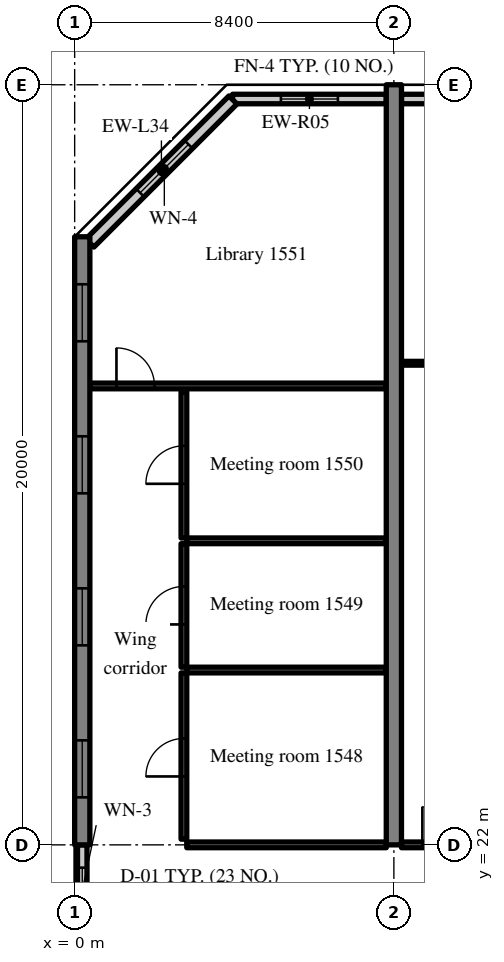
"""IFC4 building model, lengths in metres.
Left out: names, types, materials, properties, quantities, classifications, styles, units other than length and angle.
Written with IfcOpenShell. Run it as: python <this file> out.ifc"""

import sys

from ifc_helpers import new_model, si_unit, direction, frame, frame_2d, origin, place, context, subcontext, project, spatial, rectangle, extrude, source, transform, mapped, element, fill, save


model = new_model("IFC4")
c1 = context("Model", 3, precision=1e-05, world=origin(), true_north=direction((0.0, 1.0)))
c2 = subcontext(c1, "Body", "Model", "MODEL_VIEW")
j1 = project(units=[si_unit("LENGTHUNIT", "METRE"), si_unit("PLANEANGLEUNIT", "RADIAN")], contexts=[c1])
p1 = place(None, origin())
s1 = spatial("IfcSite", under=j1, at=p1, CompositionType="ELEMENT")
p2 = place(p1, origin())
s2 = spatial("IfcBuilding", under=s1, at=p2, CompositionType="ELEMENT")
p3 = place(p2, frame((0.0, 0.0, 65.8)))
s3 = spatial("IfcBuildingStorey", under=s2, at=p3, CompositionType="ELEMENT", Elevation=65.8)
m1 = source(origin(), c2, "Body", "SweptSolid", [
    extrude(rectangle(XDim=16.0, YDim=0.4, at=frame_2d((8.0, 0.0))), origin(), (0.0, 0.0, 1.0), 3.52),
])
p4 = place(p3, frame((0.2, 22.0, 0.0), z_axis=(0.0, 0.0, 1.0), x_axis=(0.0, 1.0, 0.0)))
e1 = element("IfcWall", 1, at=p4, inside=s3, PredefinedType="SHEAR", context=c2, shape_type="MappedRepresentation", body=[
    mapped(m1, transform((0.0, 0.0, 0.0), scale=1.0)),
])
m2 = source(origin(), c2, "Body", "SweptSolid", [
    extrude(rectangle(XDim=1.5, YDim=1.5, at=frame_2d((0.75, 0.75))), frame((0.0, 0.21, 0.0), z_axis=(0.0, -1.0, 0.0), x_axis=(1.0, 0.0, 0.0)), (0.0, 0.0, 1.0), 0.42),
])
p5 = place(p4, frame((1.25, 0.0, 0.9)))
e2 = element("IfcOpeningElement", 2, at=p5, cuts=e1, PredefinedType="OPENING", context=c2, shape_type="MappedRepresentation", body=[
    mapped(m2, transform((0.0, 0.0, 0.0), scale=1.0)),
])
p6 = place(p4, frame((5.25, 0.0, 0.9)))
e3 = element("IfcOpeningElement", 3, at=p6, cuts=e1, PredefinedType="OPENING", context=c2, shape_type="MappedRepresentation", body=[
    mapped(m2, transform((0.0, 0.0, 0.0), scale=1.0)),
])
p7 = place(p4, frame((9.25, 0.0, 0.9)))
e4 = element("IfcOpeningElement", 4, at=p7, cuts=e1, PredefinedType="OPENING", context=c2, shape_type="MappedRepresentation", body=[
    mapped(m2, transform((0.0, 0.0, 0.0), scale=1.0)),
])
p8 = place(p4, frame((13.25, 0.0, 0.9)))
e5 = element("IfcOpeningElement", 5, at=p8, cuts=e1, PredefinedType="OPENING", context=c2, shape_type="MappedRepresentation", body=[
    mapped(m2, transform((0.0, 0.0, 0.0), scale=1.0)),
])
m3 = source(origin(), c2, "Body", "SweptSolid", [
    extrude(rectangle(XDim=20.0, YDim=0.4, at=frame_2d((10.0, 0.0))), origin(), (0.0, 0.0, 1.0), 3.52),
])
p9 = place(p3, frame((8.4, 22.0, 0.0), z_axis=(0.0, 0.0, 1.0), x_axis=(0.0, 1.0, 0.0)))
e6 = element("IfcWall", 6, at=p9, inside=s3, PredefinedType="SHEAR", context=c2, shape_type="MappedRepresentation", body=[
    mapped(m3, transform((0.0, 0.0, 0.0), scale=1.0)),
])
m4 = source(origin(), c2, "Body", "SweptSolid", [
    extrude(rectangle(XDim=4.045, YDim=0.25, at=frame_2d((2.022, 0.0))), origin(), (0.0, 0.0, 1.0), 2.82),
])
p10 = place(p3, frame((8.2, 41.625, 0.0), z_axis=(0.0, 0.0, 1.0), x_axis=(-1.0, 0.0, 0.0)))
e7 = element("IfcWall", 7, at=p10, inside=s3, PredefinedType="SOLIDWALL", context=c2, shape_type="MappedRepresentation", body=[
    mapped(m4, transform((0.0, 0.0, 0.0), scale=1.0)),
])
m5 = source(origin(), c2, "Body", "SweptSolid", [
    extrude(rectangle(XDim=1.5, YDim=1.5, at=frame_2d((0.75, 0.75))), frame((0.0, 0.135, 0.0), z_axis=(0.0, -1.0, 0.0), x_axis=(1.0, 0.0, 0.0)), (0.0, 0.0, 1.0), 0.27),
])
p11 = place(p10, frame((1.272, 0.0, 0.9)))
e8 = element("IfcOpeningElement", 8, at=p11, cuts=e7, PredefinedType="OPENING", context=c2, shape_type="MappedRepresentation", body=[
    mapped(m5, transform((0.0, 0.0, 0.0), scale=1.0)),
])
m6 = source(origin(), c2, "Body", "SweptSolid", [
    extrude(rectangle(XDim=3.6, YDim=0.25, at=frame_2d((1.8, 0.0))), origin(), (0.0, 0.0, 1.0), 2.82),
])
p12 = place(p3, frame((12.2, 41.625, 0.0), z_axis=(0.0, 0.0, 1.0), x_axis=(-1.0, 0.0, 0.0)))
e9 = element("IfcWall", 9, at=p12, inside=s3, PredefinedType="SOLIDWALL", context=c2, shape_type="MappedRepresentation", body=[
    mapped(m6, transform((0.0, 0.0, 0.0), scale=1.0)),
])
p13 = place(p12, frame((1.05, 0.0, 0.9)))
e10 = element("IfcOpeningElement", 10, at=p13, cuts=e9, PredefinedType="OPENING", context=c2, shape_type="MappedRepresentation", body=[
    mapped(m5, transform((0.0, 0.0, 0.0), scale=1.0)),
])
m7 = source(origin(), c2, "Body", "SweptSolid", [
    extrude(rectangle(XDim=5.326, YDim=0.3, at=frame_2d((2.663, 0.0))), origin(), (0.0, 0.0, 1.0), 3.52),
])
p14 = place(p3, frame((4.166, 41.6, 0.0), z_axis=(0.0, 0.0, 1.0), x_axis=(-0.707106781187, -0.707106781187, 0.0)))
e11 = element("IfcWall", 11, at=p14, inside=s3, PredefinedType="SOLIDWALL", context=c2, shape_type="MappedRepresentation", body=[
    mapped(m7, transform((0.0, 0.0, 0.0), scale=1.0)),
])
m8 = source(origin(), c2, "Body", "SweptSolid", [
    extrude(rectangle(XDim=1.8, YDim=1.5, at=frame_2d((0.9, 0.75))), frame((0.0, 0.16, 0.0), z_axis=(0.0, -1.0, 0.0), x_axis=(1.0, 0.0, 0.0)), (0.0, 0.0, 1.0), 0.32),
])
p15 = place(p14, frame((1.654, 0.0, 0.9)))
e12 = element("IfcOpeningElement", 12, at=p15, cuts=e11, PredefinedType="OPENING", context=c2, shape_type="MappedRepresentation", body=[
    mapped(m8, transform((0.0, 0.0, 0.0), scale=1.0)),
])
m9 = source(origin(), c2, "Body", "SweptSolid", [
    extrude(rectangle(XDim=2.4, YDim=0.25, at=frame_2d((1.2, 0.0))), origin(), (0.0, 0.0, 1.0), 2.62),
])
p16 = place(p3, frame((0.2, 19.6, 0.0), z_axis=(0.0, 0.0, 1.0), x_axis=(0.0, 1.0, 0.0)))
e13 = element("IfcWall", 13, at=p16, inside=s3, PredefinedType="SOLIDWALL", context=c2, shape_type="MappedRepresentation", body=[
    mapped(m9, transform((0.0, 0.0, 0.0), scale=1.0)),
])
m10 = source(origin(), c2, "Body", "SweptSolid", [
    extrude(rectangle(XDim=1.2, YDim=1.5, at=frame_2d((0.6, 0.75))), frame((0.0, 0.135, 0.0), z_axis=(0.0, -1.0, 0.0), x_axis=(1.0, 0.0, 0.0)), (0.0, 0.0, 1.0), 0.27),
])
p17 = place(p16, frame((0.6, 0.0, 0.9)))
e14 = element("IfcOpeningElement", 14, at=p17, cuts=e13, PredefinedType="OPENING", context=c2, shape_type="MappedRepresentation", body=[
    mapped(m10, transform((0.0, 0.0, 0.0), scale=1.0)),
])
m11 = source(origin(), c2, "Body", "SweptSolid", [
    extrude(rectangle(XDim=5.25, YDim=0.15, at=frame_2d((2.625, 0.0))), origin(), (0.0, 0.0, 1.0), 2.82),
])
p18 = place(p3, frame((2.95, 22.0, 0.0), z_axis=(0.0, 0.0, 1.0), x_axis=(1.0, 0.0, 0.0)))
e15 = element("IfcWall", 15, at=p18, inside=s3, PredefinedType="PARTITIONING", context=c2, shape_type="MappedRepresentation", body=[
    mapped(m11, transform((0.0, 0.0, 0.0), scale=1.0)),
])
m12 = source(origin(), c2, "Body", "SweptSolid", [
    extrude(rectangle(XDim=4.375, YDim=0.15, at=frame_2d((2.188, 0.0))), origin(), (0.0, 0.0, 1.0), 3.52),
])
p19 = place(p3, frame((2.875, 22.15, 0.0), z_axis=(0.0, 0.0, 1.0), x_axis=(0.0, 1.0, 0.0)))
e16 = element("IfcWall", 16, at=p19, inside=s3, PredefinedType="PARTITIONING", context=c2, shape_type="MappedRepresentation", body=[
    mapped(m12, transform((0.0, 0.0, 0.0), scale=1.0)),
])
m13 = source(origin(), c2, "Body", "SweptSolid", [
    extrude(rectangle(XDim=1.0, YDim=2.1, at=frame_2d((0.5, 1.05))), frame((0.0, 0.085, 0.0), z_axis=(0.0, -1.0, 0.0), x_axis=(1.0, 0.0, 0.0)), (0.0, 0.0, 1.0), 0.17),
])
p20 = place(p19, frame((1.65, 0.0, 0.0)))
e17 = element("IfcOpeningElement", 17, at=p20, cuts=e16, PredefinedType="OPENING", context=c2, shape_type="MappedRepresentation", body=[
    mapped(m13, transform((0.0, 0.0, 0.0), scale=1.0)),
])
m14 = source(origin(), c2, "Body", "SweptSolid", [
    extrude(rectangle(XDim=5.25, YDim=0.15, at=frame_2d((2.625, 0.0))), origin(), (0.0, 0.0, 1.0), 3.52),
])
p21 = place(p3, frame((2.95, 26.6, 0.0), z_axis=(0.0, 0.0, 1.0), x_axis=(1.0, 0.0, 0.0)))
e18 = element("IfcWall", 18, at=p21, inside=s3, PredefinedType="PARTITIONING", context=c2, shape_type="MappedRepresentation", body=[
    mapped(m14, transform((0.0, 0.0, 0.0), scale=1.0)),
])
m15 = source(origin(), c2, "Body", "SweptSolid", [
    extrude(rectangle(XDim=3.25, YDim=0.15, at=frame_2d((1.625, 0.0))), origin(), (0.0, 0.0, 1.0), 3.52),
])
p22 = place(p3, frame((2.875, 26.675, 0.0), z_axis=(0.0, 0.0, 1.0), x_axis=(0.0, 1.0, 0.0)))
e19 = element("IfcWall", 19, at=p22, inside=s3, PredefinedType="PARTITIONING", context=c2, shape_type="MappedRepresentation", body=[
    mapped(m15, transform((0.0, 0.0, 0.0), scale=1.0)),
])
p23 = place(p22, frame((1.125, 0.0, 0.0)))
e20 = element("IfcOpeningElement", 20, at=p23, cuts=e19, PredefinedType="OPENING", context=c2, shape_type="MappedRepresentation", body=[
    mapped(m13, transform((0.0, 0.0, 0.0), scale=1.0)),
])
p24 = place(p3, frame((2.95, 30.0, 0.0), z_axis=(0.0, 0.0, 1.0), x_axis=(1.0, 0.0, 0.0)))
e21 = element("IfcWall", 21, at=p24, inside=s3, PredefinedType="PARTITIONING", context=c2, shape_type="MappedRepresentation", body=[
    mapped(m14, transform((0.0, 0.0, 0.0), scale=1.0)),
])
m16 = source(origin(), c2, "Body", "SweptSolid", [
    extrude(rectangle(XDim=3.85, YDim=0.15, at=frame_2d((1.925, 0.0))), origin(), (0.0, 0.0, 1.0), 3.52),
])
p25 = place(p3, frame((2.875, 30.075, 0.0), z_axis=(0.0, 0.0, 1.0), x_axis=(0.0, 1.0, 0.0)))
e22 = element("IfcWall", 22, at=p25, inside=s3, PredefinedType="PARTITIONING", context=c2, shape_type="MappedRepresentation", body=[
    mapped(m16, transform((0.0, 0.0, 0.0), scale=1.0)),
])
p26 = place(p25, frame((1.425, 0.0, 0.0)))
e23 = element("IfcOpeningElement", 23, at=p26, cuts=e22, PredefinedType="OPENING", context=c2, shape_type="MappedRepresentation", body=[
    mapped(m13, transform((0.0, 0.0, 0.0), scale=1.0)),
])
m17 = source(origin(), c2, "Body", "SweptSolid", [
    extrude(rectangle(XDim=7.8, YDim=0.15, at=frame_2d((3.9, 0.0))), origin(), (0.0, 0.0, 1.0), 3.52),
])
p27 = place(p3, frame((0.4, 34.075, 0.0), z_axis=(0.0, 0.0, 1.0), x_axis=(1.0, 0.0, 0.0)))
e24 = element("IfcWall", 24, at=p27, inside=s3, PredefinedType="PARTITIONING", context=c2, shape_type="MappedRepresentation", body=[
    mapped(m17, transform((0.0, 0.0, 0.0), scale=1.0)),
])
p28 = place(p27, frame((0.7, 0.0, 0.0)))
e25 = element("IfcOpeningElement", 25, at=p28, cuts=e24, PredefinedType="OPENING", context=c2, shape_type="MappedRepresentation", body=[
    mapped(m13, transform((0.0, 0.0, 0.0), scale=1.0)),
])
m18 = source(origin(), c2, "Body", "SweptSolid", [
    extrude(rectangle(XDim=8.0, YDim=0.1, at=frame_2d((4.0, 0.0))), origin(), (0.0, 0.0, 1.0), 3.52),
])
p29 = place(p3, frame((8.6, 34.672, 0.0), z_axis=(0.0, 0.0, 1.0), x_axis=(1.0, 0.0, 0.0)))
e26 = element("IfcWall", 26, at=p29, inside=s3, PredefinedType="PARTITIONING", context=c2, shape_type="MappedRepresentation", body=[
    mapped(m18, transform((0.0, 0.0, 0.0), scale=1.0)),
])
m19 = source(origin(), c2, "Body", "SweptSolid", [
    extrude(rectangle(XDim=1.8, YDim=2.1, at=frame_2d((0.9, 1.05))), frame((0.0, 0.06, 0.0), z_axis=(0.0, -1.0, 0.0), x_axis=(1.0, 0.0, 0.0)), (0.0, 0.0, 1.0), 0.12),
])
p30 = place(p29, frame((3.1, 0.0, 0.0)))
e27 = element("IfcOpeningElement", 27, at=p30, cuts=e26, PredefinedType="OPENING", context=c2, shape_type="MappedRepresentation", body=[
    mapped(m19, transform((0.0, 0.0, 0.0), scale=1.0)),
])
m20 = source(origin(), c2, "Body", "SweptSolid", [
    extrude(rectangle(XDim=8.0, YDim=0.15, at=frame_2d((4.0, 0.0))), origin(), (0.0, 0.0, 1.0), 2.82),
])
p31 = place(p3, frame((8.6, 22.0, 0.0), z_axis=(0.0, 0.0, 1.0), x_axis=(1.0, 0.0, 0.0)))
e28 = element("IfcWall", 28, at=p31, inside=s3, PredefinedType="PARTITIONING", context=c2, shape_type="MappedRepresentation", body=[
    mapped(m20, transform((0.0, 0.0, 0.0), scale=1.0)),
])
p32 = place(p31, frame((0.55, 0.0, 0.0)))
e29 = element("IfcOpeningElement", 29, at=p32, cuts=e28, PredefinedType="OPENING", context=c2, shape_type="MappedRepresentation", body=[
    mapped(m13, transform((0.0, 0.0, 0.0), scale=1.0)),
])
m21 = source(origin(), c2, "Body", "SweptSolid", [
    extrude(rectangle(XDim=1.5, YDim=1.5, at=frame_2d((0.75, 0.75))), frame((0.0, 0.03, 0.0), z_axis=(0.0, -1.0, 0.0), x_axis=(1.0, 0.0, 0.0)), (0.0, 0.0, 1.0), 0.06),
])
p33 = place(p11, origin())
e30 = element("IfcWindow", 30, at=p33, inside=s3, PartitioningType="SINGLE_PANEL", PredefinedType="WINDOW", context=c2, shape_type="MappedRepresentation", body=[
    mapped(m21, transform((0.0, 0.0, 0.0), scale=1.0)),
])
fill(e8, e30)
m22 = source(origin(), c2, "Body", "SweptSolid", [
    extrude(rectangle(XDim=1.8, YDim=1.5, at=frame_2d((0.9, 0.75))), frame((0.0, 0.03, 0.0), z_axis=(0.0, -1.0, 0.0), x_axis=(1.0, 0.0, 0.0)), (0.0, 0.0, 1.0), 0.06),
])
p34 = place(p15, origin())
e31 = element("IfcWindow", 31, at=p34, inside=s3, PartitioningType="SINGLE_PANEL", PredefinedType="WINDOW", context=c2, shape_type="MappedRepresentation", body=[
    mapped(m22, transform((0.0, 0.0, 0.0), scale=1.0)),
])
fill(e12, e31)
p35 = place(p5, origin())
e32 = element("IfcWindow", 32, at=p35, inside=s3, PartitioningType="SINGLE_PANEL", PredefinedType="WINDOW", context=c2, shape_type="MappedRepresentation", body=[
    mapped(m21, transform((0.0, 0.0, 0.0), scale=1.0)),
])
fill(e2, e32)
p36 = place(p6, origin())
e33 = element("IfcWindow", 33, at=p36, inside=s3, PartitioningType="SINGLE_PANEL", PredefinedType="WINDOW", context=c2, shape_type="MappedRepresentation", body=[
    mapped(m21, transform((0.0, 0.0, 0.0), scale=1.0)),
])
fill(e3, e33)
p37 = place(p7, origin())
e34 = element("IfcWindow", 34, at=p37, inside=s3, PartitioningType="SINGLE_PANEL", PredefinedType="WINDOW", context=c2, shape_type="MappedRepresentation", body=[
    mapped(m21, transform((0.0, 0.0, 0.0), scale=1.0)),
])
fill(e4, e34)
p38 = place(p8, origin())
e35 = element("IfcWindow", 35, at=p38, inside=s3, PartitioningType="SINGLE_PANEL", PredefinedType="WINDOW", context=c2, shape_type="MappedRepresentation", body=[
    mapped(m21, transform((0.0, 0.0, 0.0), scale=1.0)),
])
fill(e5, e35)
m23 = source(origin(), c2, "Body", "SweptSolid", [
    extrude(rectangle(XDim=1.2, YDim=1.5, at=frame_2d((0.6, 0.75))), frame((0.0, 0.03, 0.0), z_axis=(0.0, -1.0, 0.0), x_axis=(1.0, 0.0, 0.0)), (0.0, 0.0, 1.0), 0.06),
])
p39 = place(p17, origin())
e36 = element("IfcWindow", 36, at=p39, inside=s3, PartitioningType="SINGLE_PANEL", PredefinedType="WINDOW", context=c2, shape_type="MappedRepresentation", body=[
    mapped(m23, transform((0.0, 0.0, 0.0), scale=1.0)),
])
fill(e14, e36)
m24 = source(origin(), c2, "Body", "SweptSolid", [
    extrude(rectangle(XDim=1.0, YDim=2.1, at=frame_2d((0.5, 1.05))), frame((0.0, 0.025, 0.0), z_axis=(0.0, -1.0, 0.0), x_axis=(1.0, 0.0, 0.0)), (0.0, 0.0, 1.0), 0.05),
])
p40 = place(p20, origin())
e37 = element("IfcDoor", 37, at=p40, inside=s3, OperationType="SINGLE_SWING_LEFT", PredefinedType="DOOR", context=c2, shape_type="MappedRepresentation", body=[
    mapped(m24, transform((0.0, 0.0, 0.0), scale=1.0)),
])
fill(e17, e37)
p41 = place(p23, origin())
e38 = element("IfcDoor", 38, at=p41, inside=s3, OperationType="SINGLE_SWING_LEFT", PredefinedType="DOOR", context=c2, shape_type="MappedRepresentation", body=[
    mapped(m24, transform((0.0, 0.0, 0.0), scale=1.0)),
])
fill(e20, e38)
p42 = place(p26, origin())
e39 = element("IfcDoor", 39, at=p42, inside=s3, OperationType="SINGLE_SWING_LEFT", PredefinedType="DOOR", context=c2, shape_type="MappedRepresentation", body=[
    mapped(m24, transform((0.0, 0.0, 0.0), scale=1.0)),
])
fill(e23, e39)
p43 = place(p28, origin())
e40 = element("IfcDoor", 40, at=p43, inside=s3, OperationType="SINGLE_SWING_LEFT", PredefinedType="DOOR", context=c2, shape_type="MappedRepresentation", body=[
    mapped(m24, transform((0.0, 0.0, 0.0), scale=1.0)),
])
fill(e25, e40)
p44 = place(p32, origin())
e41 = element("IfcDoor", 41, at=p44, inside=s3, OperationType="SINGLE_SWING_LEFT", PredefinedType="DOOR", context=c2, shape_type="MappedRepresentation", body=[
    mapped(m24, transform((0.0, 0.0, 0.0), scale=1.0)),
])
fill(e29, e41)
save(model, sys.argv[1])
